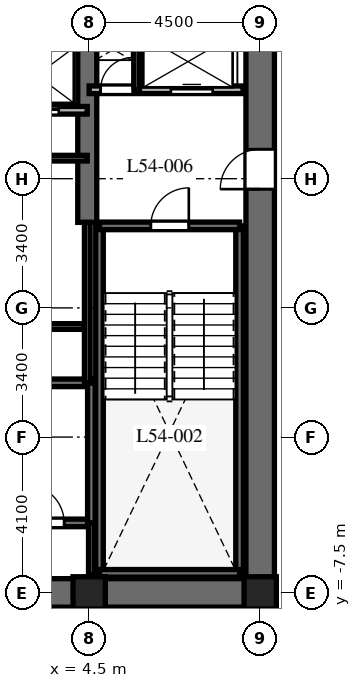
"""IFC4 building model, lengths in metres.
Left out: names, types, materials, properties, quantities, classifications, styles, units other than length and angle.
Written with IfcOpenShell. Run it as: python <this file> out.ifc"""

import sys

from ifc_helpers import new_model, si_unit, direction, frame, frame_2d, origin, origin_2d, place, context, subcontext, project, spatial, rectangle, extrude, element, fill, save


model = new_model("IFC4")
c1 = context("Model", 3, precision=1e-05, world=origin(), true_north=direction((0.0, 1.0)))
c2 = subcontext(c1, "Body", "Model", "MODEL_VIEW")
j1 = project(units=[si_unit("LENGTHUNIT", "METRE"), si_unit("PLANEANGLEUNIT", "RADIAN")], contexts=[c1])
p1 = place(None, origin())
s1 = spatial("IfcSite", under=j1, at=p1, CompositionType="ELEMENT")
p2 = place(p1, origin())
s2 = spatial("IfcBuilding", under=s1, at=p2, CompositionType="ELEMENT")
p3 = place(p2, frame((0.0, 0.0, 217.9)))
s3 = spatial("IfcBuildingStorey", under=s2, at=p3, CompositionType="ELEMENT", Elevation=217.9)
p4 = place(p3, frame((-9.375, -7.5, 0.0), z_axis=(0.0, 0.0, 1.0), x_axis=(1.0, 0.0, 0.0)))
e1 = element("IfcWall", 1, at=p4, inside=s3, PredefinedType="SHEAR", context=c2, shape_type="SweptSolid", body=[
    extrude(rectangle(XDim=18.75, YDim=0.75, at=frame_2d((9.375, 0.0))), origin(), (0.0, 0.0, 1.0), 3.8),
])
p5 = place(p4, frame((9.425, 0.0, 0.0)))
e2 = element("IfcOpeningElement", 2, at=p5, cuts=e1, PredefinedType="OPENING", context=c2, shape_type="SweptSolid", body=[
    extrude(rectangle(XDim=1.0, YDim=2.15, at=frame_2d((0.5, 1.075))), frame((0.0, 0.385, 0.0), z_axis=(0.0, -1.0, 0.0), x_axis=(1.0, 0.0, 0.0)), (0.0, 0.0, 1.0), 0.77),
])
p6 = place(p3, frame((9.0, -7.125, 0.0), z_axis=(0.0, 0.0, 1.0), x_axis=(0.0, 1.0, 0.0)))
e3 = element("IfcWall", 3, at=p6, inside=s3, PredefinedType="SHEAR", context=c2, shape_type="SweptSolid", body=[
    extrude(rectangle(XDim=14.25, YDim=0.75, at=frame_2d((7.125, 0.0))), origin(), (0.0, 0.0, 1.0), 3.8),
])
p7 = place(p6, frame((10.25, 0.0, 0.0)))
e4 = element("IfcOpeningElement", 4, at=p7, cuts=e3, PredefinedType="OPENING", context=c2, shape_type="SweptSolid", body=[
    extrude(rectangle(XDim=1.05, YDim=2.15, at=frame_2d((0.525, 1.075))), frame((0.0, 0.385, 0.0), z_axis=(0.0, -1.0, 0.0), x_axis=(1.0, 0.0, 0.0)), (0.0, 0.0, 1.0), 0.77),
])
p8 = place(p3, frame((4.45, 2.25, 0.0), z_axis=(0.0, 0.0, 1.0), x_axis=(0.0, 1.0, 0.0)))
e5 = element("IfcWall", 5, at=p8, inside=s3, PredefinedType="SHEAR", context=c2, shape_type="SweptSolid", body=[
    extrude(rectangle(XDim=4.875, YDim=0.5, at=frame_2d((2.438, 0.0))), origin(), (0.0, 0.0, 1.0), 3.8),
])
for number, where, z_axis, x_axis in (
    (6, (4.772, -6.985, 0.0), (0.0, 0.0, 1.0), (0.0, 1.0, 0.0)),
    (7, (8.458, -6.985, 0.0), (0.0, 0.0, 1.0), (0.0, 1.0, 0.0)),
):
    element("IfcWall", number, at=place(p3, frame(where, z_axis=z_axis, x_axis=x_axis)), inside=s3, PredefinedType="SHEAR", context=c2, shape_type="SweptSolid", body=[
        extrude(rectangle(XDim=9.143, YDim=0.2, at=frame_2d((4.572, 0.0))), origin(), (0.0, 0.0, 1.0), 3.8),
    ])
p9 = place(p3, frame((4.772, -6.985, 0.0), z_axis=(0.0, 0.0, 1.0), x_axis=(1.0, 0.0, 0.0)))
e8 = element("IfcWall", 8, at=p9, inside=s3, PredefinedType="SHEAR", context=c2, shape_type="SweptSolid", body=[
    extrude(rectangle(XDim=3.686, YDim=0.2, at=frame_2d((1.843, 0.0))), origin(), (0.0, 0.0, 1.0), 3.8),
])
p10 = place(p3, frame((4.772, 2.158, 0.0), z_axis=(0.0, 0.0, 1.0), x_axis=(1.0, 0.0, 0.0)))
e9 = element("IfcWall", 9, at=p10, inside=s3, PredefinedType="SHEAR", context=c2, shape_type="SweptSolid", body=[
    extrude(rectangle(XDim=3.686, YDim=0.2, at=frame_2d((1.843, 0.0))), origin(), (0.0, 0.0, 1.0), 3.8),
])
p11 = place(p10, frame((1.35, 0.0, 0.0)))
e10 = element("IfcOpeningElement", 10, at=p11, cuts=e9, PredefinedType="OPENING", context=c2, shape_type="SweptSolid", body=[
    extrude(rectangle(XDim=1.0, YDim=2.15, at=frame_2d((0.5, 1.075))), frame((0.0, 0.11, 0.0), z_axis=(0.0, -1.0, 0.0), x_axis=(1.0, 0.0, 0.0)), (0.0, 0.0, 1.0), 0.22),
])
p12 = place(p3, frame((-4.608, -5.658, 0.0), z_axis=(0.0, 0.0, 1.0), x_axis=(1.0, 0.0, 0.0)))
e11 = element("IfcWall", 11, at=p12, inside=s3, PredefinedType="SHEAR", context=c2, shape_type="SweptSolid", body=[
    extrude(rectangle(XDim=9.166, YDim=0.2, at=frame_2d((4.583, 0.0))), origin(), (0.0, 0.0, 1.0), 3.8),
])
p13 = place(p12, frame((7.45, 0.0, 0.0)))
e12 = element("IfcOpeningElement", 12, at=p13, cuts=e11, PredefinedType="OPENING", context=c2, shape_type="SweptSolid", body=[
    extrude(rectangle(XDim=1.0, YDim=2.15, at=frame_2d((0.5, 1.075))), frame((0.0, 0.11, 0.0), z_axis=(0.0, -1.0, 0.0), x_axis=(1.0, 0.0, 0.0)), (0.0, 0.0, 1.0), 0.22),
])
p14 = place(p3, frame((-4.608, -1.972, 0.0), z_axis=(0.0, 0.0, 1.0), x_axis=(1.0, 0.0, 0.0)))
e13 = element("IfcWall", 13, at=p14, inside=s3, PredefinedType="SHEAR", context=c2, shape_type="SweptSolid", body=[
    extrude(rectangle(XDim=9.166, YDim=0.2, at=frame_2d((4.583, 0.0))), origin(), (0.0, 0.0, 1.0), 3.8),
])
p15 = place(p3, frame((4.558, -5.658, 0.0), z_axis=(0.0, 0.0, 1.0), x_axis=(0.0, 1.0, 0.0)))
e14 = element("IfcWall", 14, at=p15, inside=s3, PredefinedType="SHEAR", context=c2, shape_type="SweptSolid", body=[
    extrude(rectangle(XDim=3.686, YDim=0.2, at=frame_2d((1.843, 0.0))), origin(), (0.0, 0.0, 1.0), 3.8),
])
for number, where, z_axis, x_axis in (
    (15, (4.5, -7.5, 0.0), (0.0, 0.0, 1.0), (1.0, 0.0, 0.0)),
    (16, (9.0, -7.5, 0.0), (0.0, 0.0, 1.0), (1.0, 0.0, 0.0)),
):
    element("IfcColumn", number, at=place(p3, frame(where, z_axis=z_axis, x_axis=x_axis)), inside=s3, PredefinedType="COLUMN", context=c2, shape_type="SweptSolid", body=[
        extrude(rectangle(XDim=0.85, YDim=0.85, at=origin_2d()), origin(), (0.0, 0.0, 1.0), 3.8),
    ])
p16 = place(p3, frame((4.558, -7.02, 0.0), z_axis=(0.0, 0.0, 1.0), x_axis=(0.0, 1.0, 0.0)))
e17 = element("IfcWall", 17, at=p16, inside=s3, PredefinedType="PARTITIONING", context=c2, shape_type="SweptSolid", body=[
    extrude(rectangle(XDim=1.362, YDim=0.15, at=frame_2d((0.681, 0.0))), origin(), (0.0, 0.0, 1.0), 3.5),
])
p17 = place(p3, frame((4.5, 5.74, 0.0), z_axis=(0.0, 0.0, 1.0), x_axis=(1.0, 0.0, 0.0)))
e18 = element("IfcWall", 18, at=p17, inside=s3, PredefinedType="PARTITIONING", context=c2, shape_type="SweptSolid", body=[
    extrude(rectangle(XDim=4.05, YDim=0.2, at=frame_2d((2.025, 0.0))), origin(), (0.0, 0.0, 1.0), 3.5),
])
p18 = place(p17, frame((0.3, 0.0, 0.0)))
e19 = element("IfcOpeningElement", 19, at=p18, cuts=e18, PredefinedType="OPENING", context=c2, shape_type="SweptSolid", body=[
    extrude(rectangle(XDim=0.85, YDim=2.03, at=frame_2d((0.425, 1.015))), frame((0.0, 0.11, 0.0), z_axis=(0.0, -1.0, 0.0), x_axis=(1.0, 0.0, 0.0)), (0.0, 0.0, 1.0), 0.22),
])
p19 = place(p17, frame((2.15, 0.0, 0.0)))
e20 = element("IfcOpeningElement", 20, at=p19, cuts=e18, PredefinedType="OPENING", context=c2, shape_type="SweptSolid", body=[
    extrude(rectangle(XDim=1.1, YDim=2.2, at=frame_2d((0.55, 1.1))), frame((0.0, 0.11, 0.0), z_axis=(0.0, -1.0, 0.0), x_axis=(1.0, 0.0, 0.0)), (0.0, 0.0, 1.0), 0.22),
])
p20 = place(p3, frame((5.75, 5.74, 0.0), z_axis=(0.0, 0.0, 1.0), x_axis=(0.0, 1.0, 0.0)))
e21 = element("IfcWall", 21, at=p20, inside=s3, PredefinedType="PARTITIONING", context=c2, shape_type="SweptSolid", body=[
    extrude(rectangle(XDim=1.41, YDim=0.15, at=frame_2d((0.705, 0.0))), origin(), (0.0, 0.0, 1.0), 3.5),
])
p21 = place(p3, frame((1.85, 5.2, 0.0), z_axis=(0.0, 0.0, 1.0), x_axis=(1.0, 0.0, 0.0)))
e22 = element("IfcWall", 22, at=p21, inside=s3, PredefinedType="PARTITIONING", context=c2, shape_type="SweptSolid", body=[
    extrude(rectangle(XDim=2.6, YDim=0.2, at=frame_2d((1.3, 0.0))), origin(), (0.0, 0.0, 1.0), 3.5),
])
p22 = place(p21, frame((0.75, 0.0, 0.0)))
e23 = element("IfcOpeningElement", 23, at=p22, cuts=e22, PredefinedType="OPENING", context=c2, shape_type="SweptSolid", body=[
    extrude(rectangle(XDim=1.1, YDim=2.2, at=frame_2d((0.55, 1.1))), frame((0.0, 0.11, 0.0), z_axis=(0.0, -1.0, 0.0), x_axis=(1.0, 0.0, 0.0)), (0.0, 0.0, 1.0), 0.22),
])
p23 = place(p3, frame((4.45, -1.972, 0.0), z_axis=(0.0, 0.0, 1.0), x_axis=(0.0, 1.0, 0.0)))
e24 = element("IfcWall", 24, at=p23, inside=s3, PredefinedType="PARTITIONING", context=c2, shape_type="SweptSolid", body=[
    extrude(rectangle(XDim=4.222, YDim=0.15, at=frame_2d((2.111, 0.0))), origin(), (0.0, 0.0, 1.0), 3.5),
])
p24 = place(p3, frame((1.9, 3.94, 0.0), z_axis=(0.0, 0.0, 1.0), x_axis=(1.0, 0.0, 0.0)))
e25 = element("IfcWall", 25, at=p24, inside=s3, PredefinedType="PARTITIONING", context=c2, shape_type="SweptSolid", body=[
    extrude(rectangle(XDim=2.55, YDim=0.15, at=frame_2d((1.275, 0.0))), origin(), (0.0, 0.0, 1.0), 3.5),
])
p25 = place(p3, frame((-4.36, -0.49, 0.0), z_axis=(0.0, 0.0, 1.0), x_axis=(1.0, 0.0, 0.0)))
e26 = element("IfcWall", 26, at=p25, inside=s3, PredefinedType="PARTITIONING", context=c2, shape_type="SweptSolid", body=[
    extrude(rectangle(XDim=8.72, YDim=0.15, at=frame_2d((4.36, 0.0))), origin(), (0.0, 0.0, 1.0), 3.5),
])
p26 = place(p25, frame((3.16, 0.0, 0.0)))
e27 = element("IfcOpeningElement", 27, at=p26, cuts=e26, PredefinedType="OPENING", context=c2, shape_type="SweptSolid", body=[
    extrude(rectangle(XDim=0.85, YDim=2.03, at=frame_2d((0.425, 1.015))), frame((0.0, 0.085, 0.0), z_axis=(0.0, -1.0, 0.0), x_axis=(1.0, 0.0, 0.0)), (0.0, 0.0, 1.0), 0.17),
])
p27 = place(p25, frame((5.21, 0.0, 0.0)))
e28 = element("IfcOpeningElement", 28, at=p27, cuts=e26, PredefinedType="OPENING", context=c2, shape_type="SweptSolid", body=[
    extrude(rectangle(XDim=0.85, YDim=2.03, at=frame_2d((0.425, 1.015))), frame((0.0, 0.085, 0.0), z_axis=(0.0, -1.0, 0.0), x_axis=(1.0, 0.0, 0.0)), (0.0, 0.0, 1.0), 0.17),
])
p28 = place(p11, origin())
e29 = element("IfcDoor", 29, at=p28, inside=s3, OperationType="SINGLE_SWING_RIGHT", PredefinedType="DOOR", context=c2, shape_type="SweptSolid", body=[
    extrude(rectangle(XDim=1.0, YDim=2.15, at=frame_2d((0.5, 1.075))), frame((0.0, 0.025, 0.0), z_axis=(0.0, -1.0, 0.0), x_axis=(1.0, 0.0, 0.0)), (0.0, 0.0, 1.0), 0.05),
])
fill(e10, e29)
p29 = place(p13, origin())
e30 = element("IfcDoor", 30, at=p29, inside=s3, OperationType="SINGLE_SWING_LEFT", PredefinedType="DOOR", context=c2, shape_type="SweptSolid", body=[
    extrude(rectangle(XDim=1.0, YDim=2.15, at=frame_2d((0.5, 1.075))), frame((0.0, 0.025, 0.0), z_axis=(0.0, -1.0, 0.0), x_axis=(1.0, 0.0, 0.0)), (0.0, 0.0, 1.0), 0.05),
])
fill(e12, e30)
p30 = place(p7, origin())
e31 = element("IfcDoor", 31, at=p30, inside=s3, OperationType="SINGLE_SWING_LEFT", PredefinedType="DOOR", context=c2, shape_type="SweptSolid", body=[
    extrude(rectangle(XDim=1.05, YDim=2.15, at=frame_2d((0.525, 1.075))), frame((0.0, 0.025, 0.0), z_axis=(0.0, -1.0, 0.0), x_axis=(1.0, 0.0, 0.0)), (0.0, 0.0, 1.0), 0.05),
])
fill(e4, e31)
p31 = place(p18, origin())
e32 = element("IfcDoor", 32, at=p31, inside=s3, OperationType="SINGLE_SWING_RIGHT", PredefinedType="DOOR", context=c2, shape_type="SweptSolid", body=[
    extrude(rectangle(XDim=0.85, YDim=2.03, at=frame_2d((0.425, 1.015))), frame((0.0, 0.025, 0.0), z_axis=(0.0, -1.0, 0.0), x_axis=(1.0, 0.0, 0.0)), (0.0, 0.0, 1.0), 0.05),
])
fill(e19, e32)
p32 = place(p19, origin())
e33 = element("IfcDoor", 33, at=p32, inside=s3, OperationType="SLIDING_TO_RIGHT", PredefinedType="DOOR", context=c2, shape_type="SweptSolid", body=[
    extrude(rectangle(XDim=1.1, YDim=2.2, at=frame_2d((0.55, 1.1))), frame((0.0, 0.025, 0.0), z_axis=(0.0, -1.0, 0.0), x_axis=(1.0, 0.0, 0.0)), (0.0, 0.0, 1.0), 0.05),
])
fill(e20, e33)
p33 = place(p22, origin())
e34 = element("IfcDoor", 34, at=p33, inside=s3, OperationType="SLIDING_TO_RIGHT", PredefinedType="DOOR", context=c2, shape_type="SweptSolid", body=[
    extrude(rectangle(XDim=1.1, YDim=2.2, at=frame_2d((0.55, 1.1))), frame((0.0, 0.025, 0.0), z_axis=(0.0, -1.0, 0.0), x_axis=(1.0, 0.0, 0.0)), (0.0, 0.0, 1.0), 0.05),
])
fill(e23, e34)
save(model, sys.argv[1])
